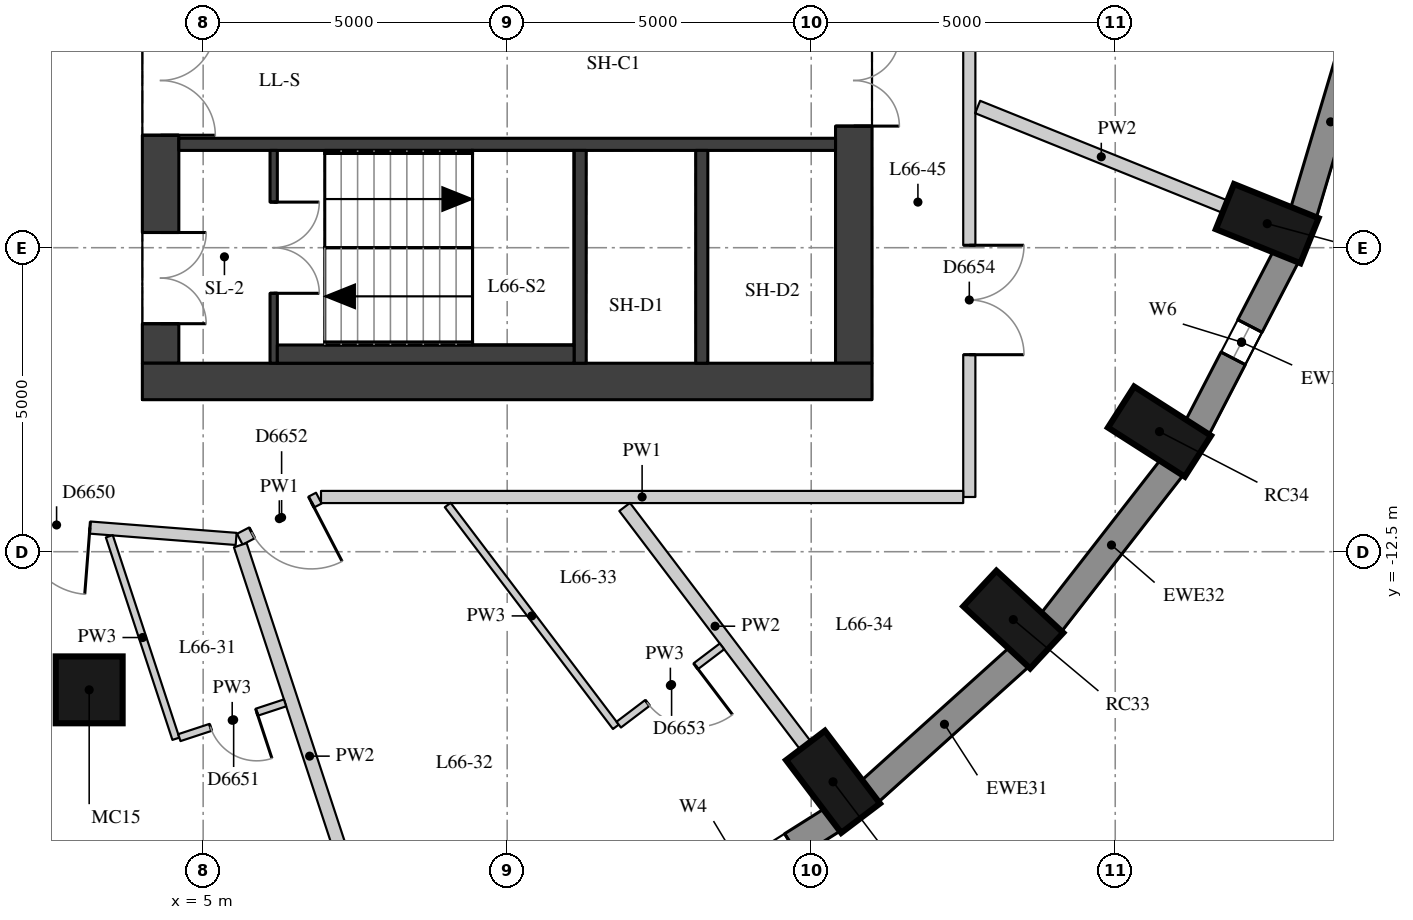
"""IFC4 building model, lengths in metres.
Left out: names, types, materials, properties, quantities, classifications, styles, units other than length and angle.
Written with IfcOpenShell. Run it as: python <this file> out.ifc"""

import sys

from ifc_helpers import new_model, si_unit, direction, frame, frame_2d, origin, origin_2d, place, context, subcontext, project, spatial, rectangle, extrude, element, fill, save


model = new_model("IFC4")
c1 = context("Model", 3, precision=1e-05, world=origin(), true_north=direction((0.0, 1.0)))
c2 = subcontext(c1, "Body", "Model", "MODEL_VIEW")
j1 = project(units=[si_unit("LENGTHUNIT", "METRE"), si_unit("PLANEANGLEUNIT", "RADIAN")], contexts=[c1])
p1 = place(None, origin())
s1 = spatial("IfcSite", under=j1, at=p1, CompositionType="ELEMENT")
p2 = place(p1, origin())
s2 = spatial("IfcBuilding", under=s1, at=p2, CompositionType="ELEMENT")
p3 = place(p2, frame((0.0, 0.0, 233.3)))
s3 = spatial("IfcBuildingStorey", under=s2, at=p3, CompositionType="ELEMENT", Elevation=233.3)
for number, where, z_axis, x_axis in (
    (1, (15.359, -16.285, 0.0), (0.0, 0.0, 1.0), (0.604, -0.797, 0.0)),
    (2, (18.323, -13.616, 0.0), (0.0, 0.0, 1.0), (0.733, -0.681, 0.0)),
    (3, (20.728, -10.525, 0.0), (0.0, 0.0, 1.0), (0.843, -0.539, 0.0)),
    (4, (22.5, -7.105, 0.0), (0.0, 0.0, 1.0), (0.928, -0.374, 0.0)),
):
    element("IfcColumn", number, at=place(p3, frame(where, z_axis=z_axis, x_axis=x_axis)), inside=s3, PredefinedType="COLUMN", context=c2, shape_type="SweptSolid", body=[
        extrude(rectangle(XDim=1.5, YDim=0.8, at=origin_2d()), origin(), (0.0, 0.0, 1.0), 3.3),
    ])
p4 = place(p3, frame((3.126, -14.772, 0.0), z_axis=(0.0, 0.0, 1.0), x_axis=(1.0, 0.0, 0.0)))
e5 = element("IfcColumn", 5, at=p4, inside=s3, PredefinedType="COLUMN", context=c2, shape_type="SweptSolid", body=[
    extrude(rectangle(XDim=1.1, YDim=1.1, at=origin_2d()), origin(), (0.0, 0.0, 1.0), 3.3),
])
p5 = place(p3, frame((12.49, -18.711, 0.0), z_axis=(0.0, 0.0, 1.0), x_axis=(0.845929139811, 0.53329531258, 0.0)))
e6 = element("IfcWall", 6, at=p5, inside=s3, PredefinedType="SOLIDWALL", context=c2, shape_type="SweptSolid", body=[
    extrude(rectangle(XDim=3.385, YDim=0.45, at=frame_2d((1.692, 0.0))), origin(), (0.0, 0.0, 1.0), 3.02),
])
p6 = place(p5, frame((0.792, 0.0, 0.4)))
e7 = element("IfcOpeningElement", 7, at=p6, cuts=e6, PredefinedType="OPENING", context=c2, shape_type="SweptSolid", body=[
    extrude(rectangle(XDim=1.8, YDim=1.75, at=frame_2d((0.9, 0.875))), frame((0.0, 0.235, 0.0), z_axis=(0.0, -1.0, 0.0), x_axis=(1.0, 0.0, 0.0)), (0.0, 0.0, 1.0), 0.47),
])
p7 = place(p3, frame((15.959, -16.448, 0.0), z_axis=(0.0, 0.0, 1.0), x_axis=(0.743166014219, 0.669107073128, 0.0)))
e8 = element("IfcWall", 8, at=p7, inside=s3, PredefinedType="SOLIDWALL", context=c2, shape_type="SweptSolid", body=[
    extrude(rectangle(XDim=3.316, YDim=0.45, at=frame_2d((1.658, 0.0))), origin(), (0.0, 0.0, 1.0), 3.02),
])
p8 = place(p3, frame((18.942, -13.672, 0.0), z_axis=(0.0, 0.0, 1.0), x_axis=(0.613898970825, 0.789384604372, 0.0)))
e9 = element("IfcWall", 9, at=p8, inside=s3, PredefinedType="SOLIDWALL", context=c2, shape_type="SweptSolid", body=[
    extrude(rectangle(XDim=3.247, YDim=0.45, at=frame_2d((1.624, 0.0))), origin(), (0.0, 0.0, 1.0), 3.02),
])
p9 = place(p3, frame((21.345, -10.468, 0.0), z_axis=(0.0, 0.0, 1.0), x_axis=(0.459921155255, 0.887959757505, 0.0)))
e10 = element("IfcWall", 10, at=p9, inside=s3, PredefinedType="SOLIDWALL", context=c2, shape_type="SweptSolid", body=[
    extrude(rectangle(XDim=3.186, YDim=0.45, at=frame_2d((1.593, 0.0))), origin(), (0.0, 0.0, 1.0), 3.02),
])
p10 = place(p9, frame((1.293, 0.0, 0.4)))
e11 = element("IfcOpeningElement", 11, at=p10, cuts=e10, PredefinedType="OPENING", context=c2, shape_type="SweptSolid", body=[
    extrude(rectangle(XDim=0.6, YDim=1.75, at=frame_2d((0.3, 0.875))), frame((0.0, 0.235, 0.0), z_axis=(0.0, -1.0, 0.0), x_axis=(1.0, 0.0, 0.0)), (0.0, 0.0, 1.0), 0.47),
])
p11 = place(p3, frame((23.094, -6.935, 0.0), z_axis=(0.0, 0.0, 1.0), x_axis=(0.285263800865, 0.958449040855, 0.0)))
e12 = element("IfcWall", 12, at=p11, inside=s3, PredefinedType="SOLIDWALL", context=c2, shape_type="SweptSolid", body=[
    extrude(rectangle(XDim=3.139, YDim=0.45, at=frame_2d((1.57, 0.0))), origin(), (0.0, 0.0, 1.0), 3.02),
])
p12 = place(p3, frame((4.3, -9.4, 0.0), z_axis=(0.0, 0.0, 1.0), x_axis=(0.0, 1.0, 0.0)))
e13 = element("IfcWall", 13, at=p12, inside=s3, PredefinedType="SHEAR", context=c2, shape_type="SweptSolid", body=[
    extrude(rectangle(XDim=18.8, YDim=0.6, at=frame_2d((9.4, 0.0))), origin(), (0.0, 0.0, 1.0), 3.02),
])
p13 = place(p12, frame((0.65, 0.0, 0.0)))
e14 = element("IfcOpeningElement", 14, at=p13, cuts=e13, PredefinedType="OPENING", context=c2, shape_type="SweptSolid", body=[
    extrude(rectangle(XDim=1.5, YDim=2.1, at=frame_2d((0.75, 1.05))), frame((0.0, 0.31, 0.0), z_axis=(0.0, -1.0, 0.0), x_axis=(1.0, 0.0, 0.0)), (0.0, 0.0, 1.0), 0.62),
])
p14 = place(p12, frame((3.75, 0.0, 0.0)))
e15 = element("IfcOpeningElement", 15, at=p14, cuts=e13, PredefinedType="OPENING", context=c2, shape_type="SweptSolid", body=[
    extrude(rectangle(XDim=1.8, YDim=2.1, at=frame_2d((0.9, 1.05))), frame((0.0, 0.31, 0.0), z_axis=(0.0, -1.0, 0.0), x_axis=(1.0, 0.0, 0.0)), (0.0, 0.0, 1.0), 0.62),
])
p15 = place(p12, frame((6.25, 0.0, 0.0)))
e16 = element("IfcOpeningElement", 16, at=p15, cuts=e13, PredefinedType="OPENING", context=c2, shape_type="SweptSolid", body=[
    extrude(rectangle(XDim=1.1, YDim=2.1, at=frame_2d((0.55, 1.05))), frame((0.0, 0.31, 0.0), z_axis=(0.0, -1.0, 0.0), x_axis=(1.0, 0.0, 0.0)), (0.0, 0.0, 1.0), 0.62),
])
p16 = place(p12, frame((8.9, 0.0, 0.0)))
e17 = element("IfcOpeningElement", 17, at=p16, cuts=e13, PredefinedType="OPENING", context=c2, shape_type="SweptSolid", body=[
    extrude(rectangle(XDim=1.0, YDim=2.1, at=frame_2d((0.5, 1.05))), frame((0.0, 0.31, 0.0), z_axis=(0.0, -1.0, 0.0), x_axis=(1.0, 0.0, 0.0)), (0.0, 0.0, 1.0), 0.62),
])
p17 = place(p12, frame((11.45, 0.0, 0.0)))
e18 = element("IfcOpeningElement", 18, at=p17, cuts=e13, PredefinedType="OPENING", context=c2, shape_type="SweptSolid", body=[
    extrude(rectangle(XDim=1.1, YDim=2.1, at=frame_2d((0.55, 1.05))), frame((0.0, 0.31, 0.0), z_axis=(0.0, -1.0, 0.0), x_axis=(1.0, 0.0, 0.0)), (0.0, 0.0, 1.0), 0.62),
])
p18 = place(p12, frame((13.25, 0.0, 0.0)))
e19 = element("IfcOpeningElement", 19, at=p18, cuts=e13, PredefinedType="OPENING", context=c2, shape_type="SweptSolid", body=[
    extrude(rectangle(XDim=1.8, YDim=2.1, at=frame_2d((0.9, 1.05))), frame((0.0, 0.31, 0.0), z_axis=(0.0, -1.0, 0.0), x_axis=(1.0, 0.0, 0.0)), (0.0, 0.0, 1.0), 0.62),
])
p19 = place(p12, frame((16.65, 0.0, 0.0)))
e20 = element("IfcOpeningElement", 20, at=p19, cuts=e13, PredefinedType="OPENING", context=c2, shape_type="SweptSolid", body=[
    extrude(rectangle(XDim=1.5, YDim=2.1, at=frame_2d((0.75, 1.05))), frame((0.0, 0.31, 0.0), z_axis=(0.0, -1.0, 0.0), x_axis=(1.0, 0.0, 0.0)), (0.0, 0.0, 1.0), 0.62),
])
p20 = place(p3, frame((15.7, -9.4, 0.0), z_axis=(0.0, 0.0, 1.0), x_axis=(0.0, 1.0, 0.0)))
e21 = element("IfcWall", 21, at=p20, inside=s3, PredefinedType="SHEAR", context=c2, shape_type="SweptSolid", body=[
    extrude(rectangle(XDim=18.8, YDim=0.6, at=frame_2d((9.4, 0.0))), origin(), (0.0, 0.0, 1.0), 3.02),
])
p21 = place(p20, frame((13.4, 0.0, 0.0)))
e22 = element("IfcOpeningElement", 22, at=p21, cuts=e21, PredefinedType="OPENING", context=c2, shape_type="SweptSolid", body=[
    extrude(rectangle(XDim=1.5, YDim=2.1, at=frame_2d((0.75, 1.05))), frame((0.0, 0.31, 0.0), z_axis=(0.0, -1.0, 0.0), x_axis=(1.0, 0.0, 0.0)), (0.0, 0.0, 1.0), 0.62),
])
p22 = place(p20, frame((3.9, 0.0, 0.0)))
e23 = element("IfcOpeningElement", 23, at=p22, cuts=e21, PredefinedType="OPENING", context=c2, shape_type="SweptSolid", body=[
    extrude(rectangle(XDim=1.5, YDim=2.1, at=frame_2d((0.75, 1.05))), frame((0.0, 0.31, 0.0), z_axis=(0.0, -1.0, 0.0), x_axis=(1.0, 0.0, 0.0)), (0.0, 0.0, 1.0), 0.62),
])
p23 = place(p3, frame((4.0, -9.7, 0.0), z_axis=(0.0, 0.0, 1.0), x_axis=(1.0, 0.0, 0.0)))
e24 = element("IfcWall", 24, at=p23, inside=s3, PredefinedType="SHEAR", context=c2, shape_type="SweptSolid", body=[
    extrude(rectangle(XDim=12.0, YDim=0.6, at=frame_2d((6.0, 0.0))), origin(), (0.0, 0.0, 1.0), 3.02),
])
p24 = place(p3, frame((4.6, -5.8, 0.0), z_axis=(0.0, 0.0, 1.0), x_axis=(1.0, 0.0, 0.0)))
e25 = element("IfcWall", 25, at=p24, inside=s3, PredefinedType="SHEAR", context=c2, shape_type="SweptSolid", body=[
    extrude(rectangle(XDim=10.8, YDim=0.2, at=frame_2d((5.4, 0.0))), origin(), (0.0, 0.0, 1.0), 3.02),
])
for number, where, z_axis, x_axis in (
    (26, (11.2, -9.4, 0.0), (0.0, 0.0, 1.0), (0.0, 1.0, 0.0)),
    (27, (13.2, -9.4, 0.0), (0.0, 0.0, 1.0), (0.0, 1.0, 0.0)),
):
    element("IfcWall", number, at=place(p3, frame(where, z_axis=z_axis, x_axis=x_axis)), inside=s3, PredefinedType="SHEAR", context=c2, shape_type="SweptSolid", body=[
        extrude(rectangle(XDim=3.5, YDim=0.2, at=frame_2d((1.75, 0.0))), origin(), (0.0, 0.0, 1.0), 3.02),
    ])
p25 = place(p3, frame((6.16, -9.4, 0.0), z_axis=(0.0, 0.0, 1.0), x_axis=(0.0, 1.0, 0.0)))
e28 = element("IfcWall", 28, at=p25, inside=s3, PredefinedType="SHEAR", context=c2, shape_type="SweptSolid", body=[
    extrude(rectangle(XDim=3.5, YDim=0.12, at=frame_2d((1.75, 0.0))), origin(), (0.0, 0.0, 1.0), 3.02),
])
p26 = place(p25, frame((1.15, 0.0, 0.0)))
e29 = element("IfcOpeningElement", 29, at=p26, cuts=e28, PredefinedType="OPENING", context=c2, shape_type="SweptSolid", body=[
    extrude(rectangle(XDim=1.5, YDim=2.1, at=frame_2d((0.75, 1.05))), frame((0.0, 0.07, 0.0), z_axis=(0.0, -1.0, 0.0), x_axis=(1.0, 0.0, 0.0)), (0.0, 0.0, 1.0), 0.14),
])
p27 = place(p3, frame((6.22, -9.25, 0.0), z_axis=(0.0, 0.0, 1.0), x_axis=(1.0, 0.0, 0.0)))
e30 = element("IfcWall", 30, at=p27, inside=s3, PredefinedType="PARTITIONING", context=c2, shape_type="SweptSolid", body=[
    extrude(rectangle(XDim=4.88, YDim=0.3, at=frame_2d((2.44, 0.0))), origin(), (0.0, 0.0, 1.0), 3.02),
])
p28 = place(p3, frame((17.6, 11.5, 0.0), z_axis=(0.0, 0.0, 1.0), x_axis=(0.0, -1.0, 0.0)))
e31 = element("IfcWall", 31, at=p28, inside=s3, PredefinedType="PARTITIONING", context=c2, shape_type="SweptSolid", body=[
    extrude(rectangle(XDim=23.1, YDim=0.2, at=frame_2d((11.55, 0.0))), origin(), (0.0, 0.0, 1.0), 3.02),
])
p29 = place(p28, frame((18.96, 0.0, 0.0)))
e32 = element("IfcOpeningElement", 32, at=p29, cuts=e31, PredefinedType="OPENING", context=c2, shape_type="SweptSolid", body=[
    extrude(rectangle(XDim=1.8, YDim=2.1, at=frame_2d((0.9, 1.05))), frame((0.0, 0.11, 0.0), z_axis=(0.0, -1.0, 0.0), x_axis=(1.0, 0.0, 0.0)), (0.0, 0.0, 1.0), 0.22),
])
p30 = place(p28, frame((11.617, 0.0, 0.0)))
e33 = element("IfcOpeningElement", 33, at=p30, cuts=e31, PredefinedType="OPENING", context=c2, shape_type="SweptSolid", body=[
    extrude(rectangle(XDim=1.8, YDim=2.1, at=frame_2d((0.9, 1.05))), frame((0.0, 0.11, 0.0), z_axis=(0.0, -1.0, 0.0), x_axis=(1.0, 0.0, 0.0)), (0.0, 0.0, 1.0), 0.22),
])
p31 = place(p28, frame((4.591, 0.0, 0.0)))
e34 = element("IfcOpeningElement", 34, at=p31, cuts=e31, PredefinedType="OPENING", context=c2, shape_type="SweptSolid", body=[
    extrude(rectangle(XDim=1.8, YDim=2.1, at=frame_2d((0.9, 1.05))), frame((0.0, 0.11, 0.0), z_axis=(0.0, -1.0, 0.0), x_axis=(1.0, 0.0, 0.0)), (0.0, 0.0, 1.0), 0.22),
])
p32 = place(p3, frame((17.5, -11.6, 0.0), z_axis=(0.0, 0.0, 1.0), x_axis=(-1.0, 0.0, 0.0)))
e35 = element("IfcWall", 35, at=p32, inside=s3, PredefinedType="PARTITIONING", context=c2, shape_type="SweptSolid", body=[
    extrude(rectangle(XDim=10.562, YDim=0.2, at=frame_2d((5.281, 0.0))), origin(), (0.0, 0.0, 1.0), 3.02),
])
p33 = place(p3, frame((6.903, -11.619, 0.0), z_axis=(0.0, 0.0, 1.0), x_axis=(-0.887353179844, -0.461090375329, 0.0)))
e36 = element("IfcWall", 36, at=p33, inside=s3, PredefinedType="PARTITIONING", context=c2, shape_type="SweptSolid", body=[
    extrude(rectangle(XDim=1.465, YDim=0.2, at=frame_2d((0.732, 0.0))), origin(), (0.0, 0.0, 1.0), 3.02),
])
p34 = place(p33, frame((0.14, 0.0, 0.0)))
e37 = element("IfcOpeningElement", 37, at=p34, cuts=e36, PredefinedType="OPENING", context=c2, shape_type="SweptSolid", body=[
    extrude(rectangle(XDim=1.1, YDim=2.1, at=frame_2d((0.55, 1.05))), frame((0.0, 0.11, 0.0), z_axis=(0.0, -1.0, 0.0), x_axis=(1.0, 0.0, 0.0)), (0.0, 0.0, 1.0), 0.22),
])
p35 = place(p3, frame((5.542, -12.29, 0.0), z_axis=(0.0, 0.0, 1.0), x_axis=(-0.996994281558, 0.077475173702, 0.0)))
e38 = element("IfcWall", 38, at=p35, inside=s3, PredefinedType="PARTITIONING", context=c2, shape_type="SweptSolid", body=[
    extrude(rectangle(XDim=13.282, YDim=0.2, at=frame_2d((6.641, 0.0))), origin(), (0.0, 0.0, 1.0), 3.02),
])
p36 = place(p35, frame((2.412, 0.0, 0.0)))
e39 = element("IfcOpeningElement", 39, at=p36, cuts=e38, PredefinedType="OPENING", context=c2, shape_type="SweptSolid", body=[
    extrude(rectangle(XDim=1.1, YDim=2.1, at=frame_2d((0.55, 1.05))), frame((0.0, 0.11, 0.0), z_axis=(0.0, -1.0, 0.0), x_axis=(1.0, 0.0, 0.0)), (0.0, 0.0, 1.0), 0.22),
])
p37 = place(p3, frame((7.891, -19.332, 0.0), z_axis=(0.0, 0.0, 1.0), x_axis=(-0.312264049527, 0.949995349132, 0.0)))
e40 = element("IfcWall", 40, at=p37, inside=s3, PredefinedType="PARTITIONING", context=c2, shape_type="SweptSolid", body=[
    extrude(rectangle(XDim=7.304, YDim=0.22, at=frame_2d((3.652, 0.0))), origin(), (0.0, 0.0, 1.0), 3.02),
])
p38 = place(p3, frame((14.906, -15.687, 0.0), z_axis=(0.0, 0.0, 1.0), x_axis=(-0.604078206052, 0.796925041, 0.0)))
e41 = element("IfcWall", 41, at=p38, inside=s3, PredefinedType="PARTITIONING", context=c2, shape_type="SweptSolid", body=[
    extrude(rectangle(XDim=4.923, YDim=0.22, at=frame_2d((2.462, 0.0))), origin(), (0.0, 0.0, 1.0), 3.02),
])
p39 = place(p3, frame((21.804, -6.824, 0.0), z_axis=(0.0, 0.0, 1.0), x_axis=(-0.927528978592, 0.373751245981, 0.0)))
e42 = element("IfcWall", 42, at=p39, inside=s3, PredefinedType="PARTITIONING", context=c2, shape_type="SweptSolid", body=[
    extrude(rectangle(XDim=4.384, YDim=0.22, at=frame_2d((2.192, 0.0))), origin(), (0.0, 0.0, 1.0), 3.02),
])
p40 = place(p3, frame((3.457, -12.246, 0.0), z_axis=(0.0, 0.0, 1.0), x_axis=(0.312255646562, -0.949998111151, 0.0)))
e43 = element("IfcWall", 43, at=p40, inside=s3, PredefinedType="PARTITIONING", context=c2, shape_type="SweptSolid", body=[
    extrude(rectangle(XDim=3.506, YDim=0.12, at=frame_2d((1.753, 0.0))), origin(), (0.0, 0.0, 1.0), 3.02),
])
p41 = place(p3, frame((9.022, -11.732, 0.0), z_axis=(0.0, 0.0, 1.0), x_axis=(0.604079451594, -0.796924096863, 0.0)))
e44 = element("IfcWall", 44, at=p41, inside=s3, PredefinedType="PARTITIONING", context=c2, shape_type="SweptSolid", body=[
    extrude(rectangle(XDim=4.578, YDim=0.12, at=frame_2d((2.289, 0.0))), origin(), (0.0, 0.0, 1.0), 3.02),
])
p42 = place(p3, frame((4.608, -15.558, 0.0), z_axis=(0.0, 0.0, 1.0), x_axis=(0.949995576072, 0.312263359111, 0.0)))
e45 = element("IfcWall", 45, at=p42, inside=s3, PredefinedType="PARTITIONING", context=c2, shape_type="SweptSolid", body=[
    extrude(rectangle(XDim=1.83, YDim=0.12, at=frame_2d((0.915, 0.0))), origin(), (0.0, 0.0, 1.0), 3.02),
])
p43 = place(p42, frame((0.54, 0.0, 0.0)))
e46 = element("IfcOpeningElement", 46, at=p43, cuts=e45, PredefinedType="OPENING", context=c2, shape_type="SweptSolid", body=[
    extrude(rectangle(XDim=0.8, YDim=2.1, at=frame_2d((0.4, 1.05))), frame((0.0, 0.07, 0.0), z_axis=(0.0, -1.0, 0.0), x_axis=(1.0, 0.0, 0.0)), (0.0, 0.0, 1.0), 0.14),
])
p44 = place(p3, frame((11.835, -15.344, 0.0), z_axis=(0.0, 0.0, 1.0), x_axis=(0.79693666797, 0.604062866964, 0.0)))
e47 = element("IfcWall", 47, at=p44, inside=s3, PredefinedType="PARTITIONING", context=c2, shape_type="SweptSolid", body=[
    extrude(rectangle(XDim=2.13, YDim=0.12, at=frame_2d((1.065, 0.0))), origin(), (0.0, 0.0, 1.0), 3.02),
])
p45 = place(p44, frame((0.59, 0.0, 0.0)))
e48 = element("IfcOpeningElement", 48, at=p45, cuts=e47, PredefinedType="OPENING", context=c2, shape_type="SweptSolid", body=[
    extrude(rectangle(XDim=1.0, YDim=2.1, at=frame_2d((0.5, 1.05))), frame((0.0, 0.07, 0.0), z_axis=(0.0, -1.0, 0.0), x_axis=(1.0, 0.0, 0.0)), (0.0, 0.0, 1.0), 0.14),
])
p46 = place(p10, origin())
e49 = element("IfcWindow", 49, at=p46, inside=s3, PartitioningType="SINGLE_PANEL", PredefinedType="WINDOW", context=c2, shape_type="SweptSolid", body=[
    extrude(rectangle(XDim=0.6, YDim=1.75, at=frame_2d((0.3, 0.875))), frame((0.0, 0.035, 0.0), z_axis=(0.0, -1.0, 0.0), x_axis=(1.0, 0.0, 0.0)), (0.0, 0.0, 1.0), 0.06),
])
fill(e11, e49)
p47 = place(p13, origin())
e50 = element("IfcDoor", 50, at=p47, inside=s3, OperationType="DOUBLE_DOOR_SINGLE_SWING", PredefinedType="DOOR", context=c2, shape_type="SweptSolid", body=[
    extrude(rectangle(XDim=1.5, YDim=2.1, at=frame_2d((0.75, 1.05))), frame((0.0, 0.025, 0.0), z_axis=(0.0, -1.0, 0.0), x_axis=(1.0, 0.0, 0.0)), (0.0, 0.0, 1.0), 0.05),
])
fill(e14, e50)
p48 = place(p14, origin())
e51 = element("IfcDoor", 51, at=p48, inside=s3, OperationType="DOUBLE_DOOR_SINGLE_SWING", PredefinedType="DOOR", context=c2, shape_type="SweptSolid", body=[
    extrude(rectangle(XDim=1.8, YDim=2.1, at=frame_2d((0.9, 1.05))), frame((0.0, 0.025, 0.0), z_axis=(0.0, -1.0, 0.0), x_axis=(1.0, 0.0, 0.0)), (0.0, 0.0, 1.0), 0.05),
])
fill(e15, e51)
p49 = place(p22, origin())
e52 = element("IfcDoor", 52, at=p49, inside=s3, OperationType="DOUBLE_DOOR_SINGLE_SWING", PredefinedType="DOOR", context=c2, shape_type="SweptSolid", body=[
    extrude(rectangle(XDim=1.5, YDim=2.1, at=frame_2d((0.75, 1.05))), frame((0.0, 0.025, 0.0), z_axis=(0.0, -1.0, 0.0), x_axis=(1.0, 0.0, 0.0)), (0.0, 0.0, 1.0), 0.05),
])
fill(e23, e52)
p50 = place(p26, origin())
e53 = element("IfcDoor", 53, at=p50, inside=s3, OperationType="DOUBLE_DOOR_SINGLE_SWING", PredefinedType="DOOR", context=c2, shape_type="SweptSolid", body=[
    extrude(rectangle(XDim=1.5, YDim=2.1, at=frame_2d((0.75, 1.05))), frame((0.0, 0.025, 0.0), z_axis=(0.0, -1.0, 0.0), x_axis=(1.0, 0.0, 0.0)), (0.0, 0.0, 1.0), 0.05),
])
fill(e29, e53)
p51 = place(p36, origin())
e54 = element("IfcDoor", 54, at=p51, inside=s3, OperationType="SINGLE_SWING_LEFT", PredefinedType="DOOR", context=c2, shape_type="SweptSolid", body=[
    extrude(rectangle(XDim=1.1, YDim=2.1, at=frame_2d((0.55, 1.05))), frame((0.0, 0.025, 0.0), z_axis=(0.0, -1.0, 0.0), x_axis=(1.0, 0.0, 0.0)), (0.0, 0.0, 1.0), 0.05),
])
fill(e39, e54)
p52 = place(p43, origin())
e55 = element("IfcDoor", 55, at=p52, inside=s3, OperationType="SINGLE_SWING_LEFT", PredefinedType="DOOR", context=c2, shape_type="SweptSolid", body=[
    extrude(rectangle(XDim=0.8, YDim=2.1, at=frame_2d((0.4, 1.05))), frame((0.0, 0.025, 0.0), z_axis=(0.0, -1.0, 0.0), x_axis=(1.0, 0.0, 0.0)), (0.0, 0.0, 1.0), 0.05),
])
fill(e46, e55)
p53 = place(p34, origin())
e56 = element("IfcDoor", 56, at=p53, inside=s3, OperationType="SINGLE_SWING_LEFT", PredefinedType="DOOR", context=c2, shape_type="SweptSolid", body=[
    extrude(rectangle(XDim=1.1, YDim=2.1, at=frame_2d((0.55, 1.05))), frame((0.0, 0.025, 0.0), z_axis=(0.0, -1.0, 0.0), x_axis=(1.0, 0.0, 0.0)), (0.0, 0.0, 1.0), 0.05),
])
fill(e37, e56)
p54 = place(p45, origin())
e57 = element("IfcDoor", 57, at=p54, inside=s3, OperationType="SINGLE_SWING_LEFT", PredefinedType="DOOR", context=c2, shape_type="SweptSolid", body=[
    extrude(rectangle(XDim=1.0, YDim=2.1, at=frame_2d((0.5, 1.05))), frame((0.0, 0.025, 0.0), z_axis=(0.0, -1.0, 0.0), x_axis=(1.0, 0.0, 0.0)), (0.0, 0.0, 1.0), 0.05),
])
fill(e48, e57)
p55 = place(p29, origin())
e58 = element("IfcDoor", 58, at=p55, inside=s3, OperationType="DOUBLE_DOOR_SINGLE_SWING", PredefinedType="DOOR", context=c2, shape_type="SweptSolid", body=[
    extrude(rectangle(XDim=1.8, YDim=2.1, at=frame_2d((0.9, 1.05))), frame((0.0, 0.025, 0.0), z_axis=(0.0, -1.0, 0.0), x_axis=(1.0, 0.0, 0.0)), (0.0, 0.0, 1.0), 0.05),
])
fill(e32, e58)
save(model, sys.argv[1])
